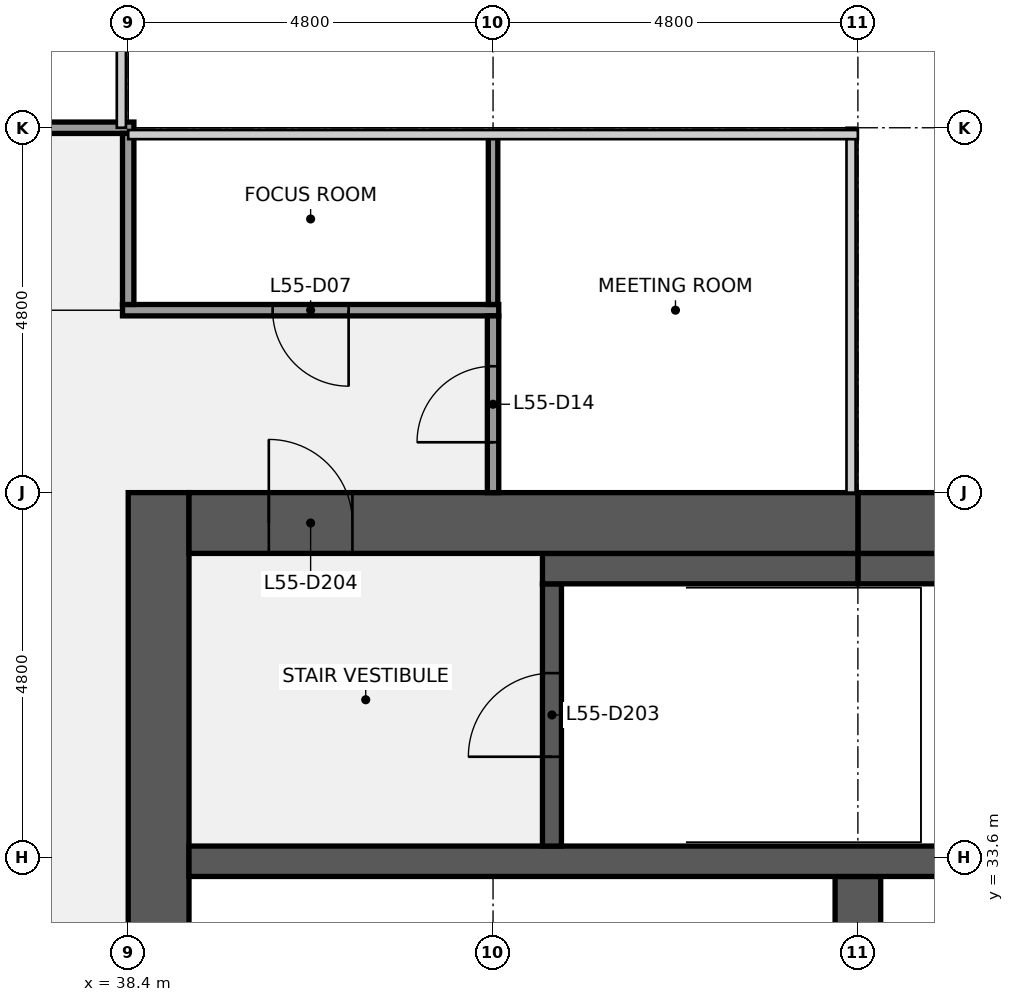
"""IFC4 building model, lengths in metres.
Left out: names, types, materials, properties, quantities, classifications, styles, units other than length and angle.
Written with IfcOpenShell. Run it as: python <this file> out.ifc"""

import sys

from ifc_helpers import new_model, si_unit, direction, frame, frame_2d, origin, place, context, subcontext, project, spatial, rectangle, extrude, element, fill, save


model = new_model("IFC4")
c1 = context("Model", 3, precision=1e-05, world=origin(), true_north=direction((0.0, 1.0)))
c2 = subcontext(c1, "Body", "Model", "MODEL_VIEW")
j1 = project(units=[si_unit("LENGTHUNIT", "METRE"), si_unit("PLANEANGLEUNIT", "RADIAN")], contexts=[c1])
p1 = place(None, origin())
s1 = spatial("IfcSite", under=j1, at=p1, CompositionType="ELEMENT")
p2 = place(p1, origin())
s2 = spatial("IfcBuilding", under=s1, at=p2, CompositionType="ELEMENT")
p3 = place(p2, frame((0.0, 0.0, 249.2)))
s3 = spatial("IfcBuildingStorey", under=s2, at=p3, CompositionType="ELEMENT", Elevation=249.2)
p4 = place(p3, frame((38.8, 9.6, 0.0), z_axis=(0.0, 0.0, 1.0), x_axis=(0.0, 1.0, 0.0)))
e1 = element("IfcWall", 1, at=p4, inside=s3, PredefinedType="SHEAR", context=c2, shape_type="SweptSolid", body=[
    extrude(rectangle(XDim=28.8, YDim=0.8, at=frame_2d((14.4, 0.0))), origin(), (0.0, 0.0, 1.0), 3.84),
])
p5 = place(p4, frame((8.7, 0.0, 0.0)))
e2 = element("IfcOpeningElement", 2, at=p5, cuts=e1, PredefinedType="OPENING", context=c2, shape_type="SweptSolid", body=[
    extrude(rectangle(XDim=1.8, YDim=2.1, at=frame_2d((0.9, 1.05))), frame((0.0, 0.41, 0.0), z_axis=(0.0, -1.0, 0.0), x_axis=(1.0, 0.0, 0.0)), (0.0, 0.0, 1.0), 0.82),
])
p6 = place(p4, frame((18.3, 0.0, 0.0)))
e3 = element("IfcOpeningElement", 3, at=p6, cuts=e1, PredefinedType="OPENING", context=c2, shape_type="SweptSolid", body=[
    extrude(rectangle(XDim=1.8, YDim=2.1, at=frame_2d((0.9, 1.05))), frame((0.0, 0.41, 0.0), z_axis=(0.0, -1.0, 0.0), x_axis=(1.0, 0.0, 0.0)), (0.0, 0.0, 1.0), 0.82),
])
p7 = place(p3, frame((48.0, 30.75, 0.0), z_axis=(0.0, 0.0, 1.0), x_axis=(0.0, 1.0, 0.0)))
e4 = element("IfcWall", 4, at=p7, inside=s3, PredefinedType="SHEAR", context=c2, shape_type="SweptSolid", body=[
    extrude(rectangle(XDim=2.6, YDim=0.6, at=frame_2d((1.3, 0.0))), origin(), (0.0, 0.0, 1.0), 3.84),
])
p8 = place(p3, frame((39.2, 33.55, 0.0), z_axis=(0.0, 0.0, 1.0), x_axis=(1.0, 0.0, 0.0)))
e5 = element("IfcWall", 5, at=p8, inside=s3, PredefinedType="SHEAR", context=c2, shape_type="SweptSolid", body=[
    extrude(rectangle(XDim=17.6, YDim=0.4, at=frame_2d((8.8, 0.0))), origin(), (0.0, 0.0, 1.0), 3.84),
])
p9 = place(p3, frame((43.975, 33.75, 0.0), z_axis=(0.0, 0.0, 1.0), x_axis=(0.0, 1.0, 0.0)))
e6 = element("IfcWall", 6, at=p9, inside=s3, PredefinedType="SHEAR", context=c2, shape_type="SweptSolid", body=[
    extrude(rectangle(XDim=3.45, YDim=0.25, at=frame_2d((1.725, 0.0))), origin(), (0.0, 0.0, 1.0), 3.84),
])
p10 = place(p9, frame((1.175, 0.0, 0.0)))
e7 = element("IfcOpeningElement", 7, at=p10, cuts=e6, PredefinedType="OPENING", context=c2, shape_type="SweptSolid", body=[
    extrude(rectangle(XDim=1.1, YDim=2.1, at=frame_2d((0.55, 1.05))), frame((0.0, 0.135, 0.0), z_axis=(0.0, -1.0, 0.0), x_axis=(1.0, 0.0, 0.0)), (0.0, 0.0, 1.0), 0.27),
])
p11 = place(p3, frame((48.0, 37.4, 0.0), z_axis=(0.0, 0.0, 1.0), x_axis=(1.0, 0.0, 0.0)))
e8 = element("IfcWall", 8, at=p11, inside=s3, PredefinedType="SHEAR", context=c2, shape_type="SweptSolid", body=[
    extrude(rectangle(XDim=3.35, YDim=0.4, at=frame_2d((1.675, 0.0))), origin(), (0.0, 0.0, 1.0), 3.84),
])
p12 = place(p3, frame((43.85, 37.4, 0.0), z_axis=(0.0, 0.0, 1.0), x_axis=(1.0, 0.0, 0.0)))
e9 = element("IfcWall", 9, at=p12, inside=s3, PredefinedType="SHEAR", context=c2, shape_type="SweptSolid", body=[
    extrude(rectangle(XDim=4.15, YDim=0.4, at=frame_2d((2.075, 0.0))), origin(), (0.0, 0.0, 1.0), 3.84),
])
p13 = place(p3, frame((48.0, 38.0, 0.0), z_axis=(0.0, 0.0, 1.0), x_axis=(1.0, 0.0, 0.0)))
e10 = element("IfcWall", 10, at=p13, inside=s3, PredefinedType="SHEAR", context=c2, shape_type="SweptSolid", body=[
    extrude(rectangle(XDim=8.8, YDim=0.8, at=frame_2d((4.4, 0.0))), origin(), (0.0, 0.0, 1.0), 3.84),
])
p14 = place(p13, frame((1.5, 0.0, 0.9)))
e11 = element("IfcOpeningElement", 11, at=p14, cuts=e10, PredefinedType="OPENING", context=c2, shape_type="SweptSolid", body=[
    extrude(rectangle(XDim=1.8, YDim=1.5, at=frame_2d((0.9, 0.75))), frame((0.0, 0.41, 0.0), z_axis=(0.0, -1.0, 0.0), x_axis=(1.0, 0.0, 0.0)), (0.0, 0.0, 1.0), 0.82),
])
p15 = place(p3, frame((39.2, 38.0, 0.0), z_axis=(0.0, 0.0, 1.0), x_axis=(1.0, 0.0, 0.0)))
e12 = element("IfcWall", 12, at=p15, inside=s3, PredefinedType="SHEAR", context=c2, shape_type="SweptSolid", body=[
    extrude(rectangle(XDim=8.8, YDim=0.8, at=frame_2d((4.4, 0.0))), origin(), (0.0, 0.0, 1.0), 3.84),
])
p16 = place(p15, frame((1.05, 0.0, 0.0)))
e13 = element("IfcOpeningElement", 13, at=p16, cuts=e12, PredefinedType="OPENING", context=c2, shape_type="SweptSolid", body=[
    extrude(rectangle(XDim=1.1, YDim=2.1, at=frame_2d((0.55, 1.05))), frame((0.0, 0.41, 0.0), z_axis=(0.0, -1.0, 0.0), x_axis=(1.0, 0.0, 0.0)), (0.0, 0.0, 1.0), 0.82),
])
p17 = place(p3, frame((38.325, 40.8, 0.0), z_axis=(0.0, 0.0, 1.0), x_axis=(1.0, 0.0, 0.0)))
e14 = element("IfcWall", 14, at=p17, inside=s3, PredefinedType="PARTITIONING", context=c2, shape_type="SweptSolid", body=[
    extrude(rectangle(XDim=4.95, YDim=0.15, at=frame_2d((2.475, 0.0))), origin(), (0.0, 0.0, 1.0), 2.87),
])
p18 = place(p17, frame((1.975, 0.0, 0.0)))
e15 = element("IfcOpeningElement", 15, at=p18, cuts=e14, PredefinedType="OPENING", context=c2, shape_type="SweptSolid", body=[
    extrude(rectangle(XDim=1.0, YDim=2.1, at=frame_2d((0.5, 1.05))), frame((0.0, 0.085, 0.0), z_axis=(0.0, -1.0, 0.0), x_axis=(1.0, 0.0, 0.0)), (0.0, 0.0, 1.0), 0.17),
])
p19 = place(p3, frame((19.125, 43.2, 0.0), z_axis=(0.0, 0.0, 1.0), x_axis=(1.0, 0.0, 0.0)))
e16 = element("IfcWall", 16, at=p19, inside=s3, PredefinedType="PARTITIONING", context=c2, shape_type="SweptSolid", body=[
    extrude(rectangle(XDim=19.35, YDim=0.15, at=frame_2d((9.675, 0.0))), origin(), (0.0, 0.0, 1.0), 2.87),
])
p20 = place(p19, frame((4.375, 0.0, 0.0)))
e17 = element("IfcOpeningElement", 17, at=p20, cuts=e16, PredefinedType="OPENING", context=c2, shape_type="SweptSolid", body=[
    extrude(rectangle(XDim=1.0, YDim=2.1, at=frame_2d((0.5, 1.05))), frame((0.0, 0.085, 0.0), z_axis=(0.0, -1.0, 0.0), x_axis=(1.0, 0.0, 0.0)), (0.0, 0.0, 1.0), 0.17),
])
p21 = place(p19, frame((13.975, 0.0, 0.0)))
e18 = element("IfcOpeningElement", 18, at=p21, cuts=e16, PredefinedType="OPENING", context=c2, shape_type="SweptSolid", body=[
    extrude(rectangle(XDim=1.0, YDim=2.1, at=frame_2d((0.5, 1.05))), frame((0.0, 0.085, 0.0), z_axis=(0.0, -1.0, 0.0), x_axis=(1.0, 0.0, 0.0)), (0.0, 0.0, 1.0), 0.17),
])
p22 = place(p3, frame((38.4, 40.875, 0.0), z_axis=(0.0, 0.0, 1.0), x_axis=(0.0, 1.0, 0.0)))
e19 = element("IfcWall", 19, at=p22, inside=s3, PredefinedType="PARTITIONING", context=c2, shape_type="SweptSolid", body=[
    extrude(rectangle(XDim=2.25, YDim=0.15, at=frame_2d((1.125, 0.0))), origin(), (0.0, 0.0, 1.0), 2.87),
])
p23 = place(p3, frame((43.2, 40.875, 0.0), z_axis=(0.0, 0.0, 1.0), x_axis=(0.0, 1.0, 0.0)))
e20 = element("IfcWall", 20, at=p23, inside=s3, PredefinedType="PARTITIONING", context=c2, shape_type="SweptSolid", body=[
    extrude(rectangle(XDim=2.225, YDim=0.125, at=frame_2d((1.113, 0.0))), origin(), (0.0, 0.0, 1.0), 2.87),
])
p24 = place(p3, frame((43.2, 38.4, 0.0), z_axis=(0.0, 0.0, 1.0), x_axis=(0.0, 1.0, 0.0)))
e21 = element("IfcWall", 21, at=p24, inside=s3, PredefinedType="PARTITIONING", context=c2, shape_type="SweptSolid", body=[
    extrude(rectangle(XDim=2.325, YDim=0.15, at=frame_2d((1.163, 0.0))), origin(), (0.0, 0.0, 1.0), 2.87),
])
p25 = place(p24, frame((0.663, 0.0, 0.0)))
e22 = element("IfcOpeningElement", 22, at=p25, cuts=e21, PredefinedType="OPENING", context=c2, shape_type="SweptSolid", body=[
    extrude(rectangle(XDim=1.0, YDim=2.1, at=frame_2d((0.5, 1.05))), frame((0.0, 0.085, 0.0), z_axis=(0.0, -1.0, 0.0), x_axis=(1.0, 0.0, 0.0)), (0.0, 0.0, 1.0), 0.17),
])
p26 = place(p10, origin())
e23 = element("IfcDoor", 23, at=p26, inside=s3, OperationType="SINGLE_SWING_LEFT", PredefinedType="DOOR", context=c2, shape_type="SweptSolid", body=[
    extrude(rectangle(XDim=1.1, YDim=2.1, at=frame_2d((0.55, 1.05))), frame((0.0, 0.025, 0.0), z_axis=(0.0, -1.0, 0.0), x_axis=(1.0, 0.0, 0.0)), (0.0, 0.0, 1.0), 0.05),
])
fill(e7, e23)
p27 = place(p16, origin())
e24 = element("IfcDoor", 24, at=p27, inside=s3, OperationType="SINGLE_SWING_LEFT", PredefinedType="DOOR", context=c2, shape_type="SweptSolid", body=[
    extrude(rectangle(XDim=1.1, YDim=2.1, at=frame_2d((0.55, 1.05))), frame((0.0, 0.025, 0.0), z_axis=(0.0, -1.0, 0.0), x_axis=(1.0, 0.0, 0.0)), (0.0, 0.0, 1.0), 0.05),
])
fill(e13, e24)
p28 = place(p18, origin())
e25 = element("IfcDoor", 25, at=p28, inside=s3, OperationType="SINGLE_SWING_RIGHT", PredefinedType="DOOR", context=c2, shape_type="SweptSolid", body=[
    extrude(rectangle(XDim=1.0, YDim=2.1, at=frame_2d((0.5, 1.05))), frame((0.0, 0.025, 0.0), z_axis=(0.0, -1.0, 0.0), x_axis=(1.0, 0.0, 0.0)), (0.0, 0.0, 1.0), 0.05),
])
fill(e15, e25)
p29 = place(p25, origin())
e26 = element("IfcDoor", 26, at=p29, inside=s3, OperationType="SINGLE_SWING_LEFT", PredefinedType="DOOR", context=c2, shape_type="SweptSolid", body=[
    extrude(rectangle(XDim=1.0, YDim=2.1, at=frame_2d((0.5, 1.05))), frame((0.0, 0.025, 0.0), z_axis=(0.0, -1.0, 0.0), x_axis=(1.0, 0.0, 0.0)), (0.0, 0.0, 1.0), 0.05),
])
fill(e22, e26)
save(model, sys.argv[1])
